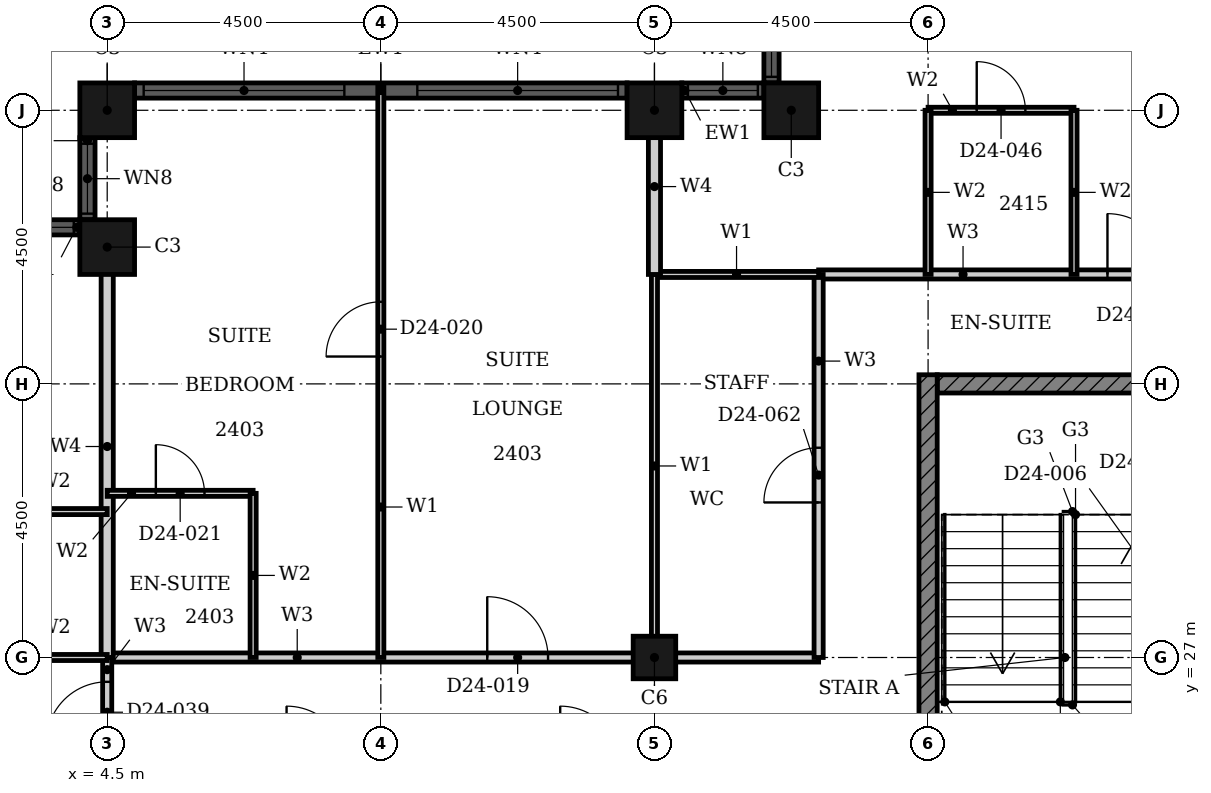
"""IFC4 building model, lengths in metres.
Left out: names, types, materials, properties, quantities, classifications, styles, units other than length and angle.
Written with IfcOpenShell. Run it as: python <this file> out.ifc"""

import sys

from ifc_helpers import new_model, si_unit, direction, frame, frame_2d, origin, origin_2d, place, context, subcontext, project, spatial, rectangle, hollow_rectangle, extrude, element, fill, save


model = new_model("IFC4")
c1 = context("Model", 3, precision=1e-05, world=origin(), true_north=direction((0.0, 1.0)))
c2 = subcontext(c1, "Body", "Model", "MODEL_VIEW")
j1 = project(units=[si_unit("LENGTHUNIT", "METRE"), si_unit("PLANEANGLEUNIT", "RADIAN")], contexts=[c1])
p1 = place(None, origin())
s1 = spatial("IfcSite", under=j1, at=p1, CompositionType="ELEMENT")
p2 = place(p1, origin())
s2 = spatial("IfcBuilding", under=s1, at=p2, CompositionType="ELEMENT")
p3 = place(p2, frame((0.0, 0.0, 100.8)))
s3 = spatial("IfcBuildingStorey", under=s2, at=p3, CompositionType="ELEMENT", Elevation=100.8)
for number, where, z_axis, x_axis in (
    (1, (15.75, 36.0, 0.0), (0.0, 0.0, 1.0), (1.0, 0.0, 0.0)),
    (2, (13.5, 36.0, 0.0), (0.0, 0.0, 1.0), (1.0, 0.0, 0.0)),
    (3, (4.5, 36.0, 0.0), (0.0, 0.0, 1.0), (1.0, 0.0, 0.0)),
    (4, (4.5, 33.75, 0.0), (0.0, 0.0, 1.0), (1.0, 0.0, 0.0)),
):
    element("IfcColumn", number, at=place(p3, frame(where, z_axis=z_axis, x_axis=x_axis)), inside=s3, PredefinedType="COLUMN", context=c2, shape_type="SweptSolid", body=[
        extrude(hollow_rectangle(XDim=0.9, YDim=0.9, WallThickness=0.028, at=origin_2d()), origin(), (0.0, 0.0, 1.0), 3.6),
    ])
p4 = place(p3, frame((13.5, 27.0, 0.0), z_axis=(0.0, 0.0, 1.0), x_axis=(1.0, 0.0, 0.0)))
e5 = element("IfcColumn", 5, at=p4, inside=s3, PredefinedType="COLUMN", context=c2, shape_type="SweptSolid", body=[
    extrude(hollow_rectangle(XDim=0.7, YDim=0.7, WallThickness=0.022, at=origin_2d()), origin(), (0.0, 0.0, 1.0), 3.6),
])
p5 = place(p3, frame((15.425, 37.8, 0.0), z_axis=(0.0, 0.0, 1.0), x_axis=(0.0, -1.0, 0.0)))
e6 = element("IfcWall", 6, at=p5, inside=s3, PredefinedType="SOLIDWALL", context=c2, shape_type="SweptSolid", body=[
    extrude(rectangle(XDim=1.35, YDim=0.25, at=frame_2d((0.675, 0.0))), origin(), (0.0, 0.0, 1.0), 3.6),
])
p6 = place(p5, frame((0.1, 0.0, 0.9)))
e7 = element("IfcOpeningElement", 7, at=p6, cuts=e6, PredefinedType="OPENING", context=c2, shape_type="SweptSolid", body=[
    extrude(rectangle(XDim=1.15, YDim=2.08, at=frame_2d((0.575, 1.04))), frame((0.0, 0.135, 0.0), z_axis=(0.0, -1.0, 0.0), x_axis=(1.0, 0.0, 0.0)), (0.0, 0.0, 1.0), 0.27),
])
p7 = place(p3, frame((15.3, 36.325, 0.0), z_axis=(0.0, 0.0, 1.0), x_axis=(-1.0, 0.0, 0.0)))
e8 = element("IfcWall", 8, at=p7, inside=s3, PredefinedType="SOLIDWALL", context=c2, shape_type="SweptSolid", body=[
    extrude(rectangle(XDim=1.35, YDim=0.25, at=frame_2d((0.675, 0.0))), origin(), (0.0, 0.0, 1.0), 3.6),
])
p8 = place(p7, frame((0.1, 0.0, 0.9)))
e9 = element("IfcOpeningElement", 9, at=p8, cuts=e8, PredefinedType="OPENING", context=c2, shape_type="SweptSolid", body=[
    extrude(rectangle(XDim=1.15, YDim=2.08, at=frame_2d((0.575, 1.04))), frame((0.0, 0.135, 0.0), z_axis=(0.0, -1.0, 0.0), x_axis=(1.0, 0.0, 0.0)), (0.0, 0.0, 1.0), 0.27),
])
p9 = place(p3, frame((13.05, 36.325, 0.0), z_axis=(0.0, 0.0, 1.0), x_axis=(-1.0, 0.0, 0.0)))
e10 = element("IfcWall", 10, at=p9, inside=s3, PredefinedType="SOLIDWALL", context=c2, shape_type="SweptSolid", body=[
    extrude(rectangle(XDim=8.1, YDim=0.25, at=frame_2d((4.05, 0.0))), origin(), (0.0, 0.0, 1.0), 3.6),
])
p10 = place(p9, frame((0.15, 0.0, 0.9)))
e11 = element("IfcOpeningElement", 11, at=p10, cuts=e10, PredefinedType="OPENING", context=c2, shape_type="SweptSolid", body=[
    extrude(rectangle(XDim=3.3, YDim=2.08, at=frame_2d((1.65, 1.04))), frame((0.0, 0.135, 0.0), z_axis=(0.0, -1.0, 0.0), x_axis=(1.0, 0.0, 0.0)), (0.0, 0.0, 1.0), 0.27),
])
p11 = place(p9, frame((4.65, 0.0, 0.9)))
e12 = element("IfcOpeningElement", 12, at=p11, cuts=e10, PredefinedType="OPENING", context=c2, shape_type="SweptSolid", body=[
    extrude(rectangle(XDim=3.3, YDim=2.08, at=frame_2d((1.65, 1.04))), frame((0.0, 0.135, 0.0), z_axis=(0.0, -1.0, 0.0), x_axis=(1.0, 0.0, 0.0)), (0.0, 0.0, 1.0), 0.27),
])
p12 = place(p3, frame((4.175, 35.55, 0.0), z_axis=(0.0, 0.0, 1.0), x_axis=(0.0, -1.0, 0.0)))
e13 = element("IfcWall", 13, at=p12, inside=s3, PredefinedType="SOLIDWALL", context=c2, shape_type="SweptSolid", body=[
    extrude(rectangle(XDim=1.35, YDim=0.25, at=frame_2d((0.675, 0.0))), origin(), (0.0, 0.0, 1.0), 3.6),
])
p13 = place(p12, frame((0.1, 0.0, 0.9)))
e14 = element("IfcOpeningElement", 14, at=p13, cuts=e13, PredefinedType="OPENING", context=c2, shape_type="SweptSolid", body=[
    extrude(rectangle(XDim=1.15, YDim=2.08, at=frame_2d((0.575, 1.04))), frame((0.0, 0.135, 0.0), z_axis=(0.0, -1.0, 0.0), x_axis=(1.0, 0.0, 0.0)), (0.0, 0.0, 1.0), 0.27),
])
p14 = place(p3, frame((4.05, 34.075, 0.0), z_axis=(0.0, 0.0, 1.0), x_axis=(-1.0, 0.0, 0.0)))
e15 = element("IfcWall", 15, at=p14, inside=s3, PredefinedType="SOLIDWALL", context=c2, shape_type="SweptSolid", body=[
    extrude(rectangle(XDim=1.35, YDim=0.25, at=frame_2d((0.675, 0.0))), origin(), (0.0, 0.0, 1.0), 3.6),
])
p15 = place(p14, frame((0.1, 0.0, 0.9)))
e16 = element("IfcOpeningElement", 16, at=p15, cuts=e15, PredefinedType="OPENING", context=c2, shape_type="SweptSolid", body=[
    extrude(rectangle(XDim=1.15, YDim=2.08, at=frame_2d((0.575, 1.04))), frame((0.0, 0.135, 0.0), z_axis=(0.0, -1.0, 0.0), x_axis=(1.0, 0.0, 0.0)), (0.0, 0.0, 1.0), 0.27),
])
p16 = place(p3, frame((18.15, 31.5, 0.0), z_axis=(0.0, 0.0, 1.0), x_axis=(1.0, 0.0, 0.0)))
e17 = element("IfcWall", 17, at=p16, inside=s3, PredefinedType="SHEAR", context=c2, shape_type="SweptSolid", body=[
    extrude(rectangle(XDim=6.797, YDim=0.3, at=frame_2d((3.398, 0.0))), origin(), (0.0, 0.0, 1.0), 3.3),
])
p17 = place(p16, frame((4.736, 0.0, 0.0)))
e18 = element("IfcOpeningElement", 18, at=p17, cuts=e17, PredefinedType="OPENING", context=c2, shape_type="SweptSolid", body=[
    extrude(rectangle(XDim=1.8, YDim=2.1, at=frame_2d((0.9, 1.05))), frame((0.0, 0.16, 0.0), z_axis=(0.0, -1.0, 0.0), x_axis=(1.0, 0.0, 0.0)), (0.0, 0.0, 1.0), 0.32),
])
p18 = place(p3, frame((18.0, 22.35, 0.0), z_axis=(0.0, 0.0, 1.0), x_axis=(0.0, 1.0, 0.0)))
e19 = element("IfcWall", 19, at=p18, inside=s3, PredefinedType="SHEAR", context=c2, shape_type="SweptSolid", body=[
    extrude(rectangle(XDim=9.3, YDim=0.3, at=frame_2d((4.65, 0.0))), origin(), (0.0, 0.0, 1.0), 3.3),
])
p19 = place(p3, frame((4.5, 27.0, 0.0), z_axis=(0.0, 0.0, 1.0), x_axis=(1.0, 0.0, 0.0)))
e20 = element("IfcWall", 20, at=p19, inside=s3, PredefinedType="PARTITIONING", context=c2, shape_type="SweptSolid", body=[
    extrude(rectangle(XDim=11.7, YDim=0.15, at=frame_2d((5.85, 0.0))), origin(), (0.0, 0.0, 1.0), 2.58),
])
p20 = place(p19, frame((6.25, 0.0, 0.0)))
e21 = element("IfcOpeningElement", 21, at=p20, cuts=e20, PredefinedType="OPENING", context=c2, shape_type="SweptSolid", body=[
    extrude(rectangle(XDim=1.0, YDim=2.1, at=frame_2d((0.5, 1.05))), frame((0.0, 0.085, 0.0), z_axis=(0.0, -1.0, 0.0), x_axis=(1.0, 0.0, 0.0)), (0.0, 0.0, 1.0), 0.17),
])
p21 = place(p3, frame((16.2, 33.3, 0.0), z_axis=(0.0, 0.0, 1.0), x_axis=(1.0, 0.0, 0.0)))
e22 = element("IfcWall", 22, at=p21, inside=s3, PredefinedType="PARTITIONING", context=c2, shape_type="SweptSolid", body=[
    extrude(rectangle(XDim=15.3, YDim=0.15, at=frame_2d((7.65, 0.0))), origin(), (0.0, 0.0, 1.0), 3.3),
])
p22 = place(p21, frame((4.75, 0.0, 0.0)))
e23 = element("IfcOpeningElement", 23, at=p22, cuts=e22, PredefinedType="OPENING", context=c2, shape_type="SweptSolid", body=[
    extrude(rectangle(XDim=1.0, YDim=2.1, at=frame_2d((0.5, 1.05))), frame((0.0, 0.085, 0.0), z_axis=(0.0, -1.0, 0.0), x_axis=(1.0, 0.0, 0.0)), (0.0, 0.0, 1.0), 0.17),
])
p23 = place(p21, frame((7.65, 0.0, 0.0)))
e24 = element("IfcOpeningElement", 24, at=p23, cuts=e22, PredefinedType="OPENING", context=c2, shape_type="SweptSolid", body=[
    extrude(rectangle(XDim=0.9, YDim=2.1, at=frame_2d((0.45, 1.05))), frame((0.0, 0.085, 0.0), z_axis=(0.0, -1.0, 0.0), x_axis=(1.0, 0.0, 0.0)), (0.0, 0.0, 1.0), 0.17),
])
p24 = place(p21, frame((12.15, 0.0, 0.0)))
e25 = element("IfcOpeningElement", 25, at=p24, cuts=e22, PredefinedType="OPENING", context=c2, shape_type="SweptSolid", body=[
    extrude(rectangle(XDim=0.9, YDim=2.1, at=frame_2d((0.45, 1.05))), frame((0.0, 0.085, 0.0), z_axis=(0.0, -1.0, 0.0), x_axis=(1.0, 0.0, 0.0)), (0.0, 0.0, 1.0), 0.17),
])
p25 = place(p3, frame((16.2, 27.0, 0.0), z_axis=(0.0, 0.0, 1.0), x_axis=(0.0, 1.0, 0.0)))
e26 = element("IfcWall", 26, at=p25, inside=s3, PredefinedType="PARTITIONING", context=c2, shape_type="SweptSolid", body=[
    extrude(rectangle(XDim=6.3, YDim=0.15, at=frame_2d((3.15, 0.0))), origin(), (0.0, 0.0, 1.0), 3.3),
])
p26 = place(p25, frame((2.55, 0.0, 0.0)))
e27 = element("IfcOpeningElement", 27, at=p26, cuts=e26, PredefinedType="OPENING", context=c2, shape_type="SweptSolid", body=[
    extrude(rectangle(XDim=0.9, YDim=2.1, at=frame_2d((0.45, 1.05))), frame((0.0, 0.085, 0.0), z_axis=(0.0, -1.0, 0.0), x_axis=(1.0, 0.0, 0.0)), (0.0, 0.0, 1.0), 0.17),
])
p27 = place(p3, frame((4.5, 25.2, 0.0), z_axis=(0.0, 0.0, 1.0), x_axis=(0.0, 1.0, 0.0)))
e28 = element("IfcWall", 28, at=p27, inside=s3, PredefinedType="PARTITIONING", context=c2, shape_type="SweptSolid", body=[
    extrude(rectangle(XDim=1.8, YDim=0.15, at=frame_2d((0.9, 0.0))), origin(), (0.0, 0.0, 1.0), 3.3),
])
p28 = place(p27, frame((0.4, 0.0, 0.0)))
e29 = element("IfcOpeningElement", 29, at=p28, cuts=e28, PredefinedType="OPENING", context=c2, shape_type="SweptSolid", body=[
    extrude(rectangle(XDim=1.0, YDim=2.1, at=frame_2d((0.5, 1.05))), frame((0.0, 0.085, 0.0), z_axis=(0.0, -1.0, 0.0), x_axis=(1.0, 0.0, 0.0)), (0.0, 0.0, 1.0), 0.17),
])
p29 = place(p3, frame((13.5, 33.3, 0.0), z_axis=(0.0, 0.0, 1.0), x_axis=(1.0, 0.0, 0.0)))
e30 = element("IfcWall", 30, at=p29, inside=s3, PredefinedType="PARTITIONING", context=c2, shape_type="SweptSolid", body=[
    extrude(rectangle(XDim=2.7, YDim=0.1, at=frame_2d((1.35, 0.0))), origin(), (0.0, 0.0, 1.0), 3.3),
])
p30 = place(p3, frame((13.5, 27.0, 0.0), z_axis=(0.0, 0.0, 1.0), x_axis=(0.0, 1.0, 0.0)))
e31 = element("IfcWall", 31, at=p30, inside=s3, PredefinedType="PARTITIONING", context=c2, shape_type="SweptSolid", body=[
    extrude(rectangle(XDim=6.3, YDim=0.1, at=frame_2d((3.15, 0.0))), origin(), (0.0, 0.0, 1.0), 2.38),
])
p31 = place(p3, frame((9.0, 27.0, 0.0), z_axis=(0.0, 0.0, 1.0), x_axis=(0.0, 1.0, 0.0)))
e32 = element("IfcWall", 32, at=p31, inside=s3, PredefinedType="PARTITIONING", context=c2, shape_type="SweptSolid", body=[
    extrude(rectangle(XDim=9.39, YDim=0.1, at=frame_2d((4.695, 0.0))), origin(), (0.0, 0.0, 1.0), 3.3),
])
p32 = place(p31, frame((4.95, 0.0, 0.0)))
e33 = element("IfcOpeningElement", 33, at=p32, cuts=e32, PredefinedType="OPENING", context=c2, shape_type="SweptSolid", body=[
    extrude(rectangle(XDim=0.9, YDim=2.1, at=frame_2d((0.45, 1.05))), frame((0.0, 0.06, 0.0), z_axis=(0.0, -1.0, 0.0), x_axis=(1.0, 0.0, 0.0)), (0.0, 0.0, 1.0), 0.12),
])
p33 = place(p3, frame((13.5, 33.3, 0.0), z_axis=(0.0, 0.0, 1.0), x_axis=(0.0, 1.0, 0.0)))
e34 = element("IfcWall", 34, at=p33, inside=s3, PredefinedType="PARTITIONING", context=c2, shape_type="SweptSolid", body=[
    extrude(rectangle(XDim=2.89, YDim=0.2, at=frame_2d((1.445, 0.0))), origin(), (0.0, 0.0, 1.0), 2.38),
])
p34 = place(p3, frame((4.5, 27.0, 0.0), z_axis=(0.0, 0.0, 1.0), x_axis=(0.0, 1.0, 0.0)))
e35 = element("IfcWall", 35, at=p34, inside=s3, PredefinedType="PARTITIONING", context=c2, shape_type="SweptSolid", body=[
    extrude(rectangle(XDim=6.94, YDim=0.2, at=frame_2d((3.47, 0.0))), origin(), (0.0, 0.0, 1.0), 3.3),
])
p35 = place(p3, frame((1.8, 27.0, 0.0), z_axis=(0.0, 0.0, 1.0), x_axis=(1.0, 0.0, 0.0)))
e36 = element("IfcWall", 36, at=p35, inside=s3, PredefinedType="PARTITIONING", context=c2, shape_type="SweptSolid", body=[
    extrude(rectangle(XDim=2.7, YDim=0.1, at=frame_2d((1.35, 0.0))), origin(), (0.0, 0.0, 1.0), 2.58),
])
p36 = place(p3, frame((1.8, 29.4, 0.0), z_axis=(0.0, 0.0, 1.0), x_axis=(1.0, 0.0, 0.0)))
e37 = element("IfcWall", 37, at=p36, inside=s3, PredefinedType="PARTITIONING", context=c2, shape_type="SweptSolid", body=[
    extrude(rectangle(XDim=2.7, YDim=0.1, at=frame_2d((1.35, 0.0))), origin(), (0.0, 0.0, 1.0), 3.3),
])
p37 = place(p3, frame((4.5, 29.7, 0.0), z_axis=(0.0, 0.0, 1.0), x_axis=(1.0, 0.0, 0.0)))
e38 = element("IfcWall", 38, at=p37, inside=s3, PredefinedType="PARTITIONING", context=c2, shape_type="SweptSolid", body=[
    extrude(rectangle(XDim=2.4, YDim=0.1, at=frame_2d((1.2, 0.0))), origin(), (0.0, 0.0, 1.0), 3.3),
])
p38 = place(p37, frame((0.8, 0.0, 0.0)))
e39 = element("IfcOpeningElement", 39, at=p38, cuts=e38, PredefinedType="OPENING", context=c2, shape_type="SweptSolid", body=[
    extrude(rectangle(XDim=0.8, YDim=2.1, at=frame_2d((0.4, 1.05))), frame((0.0, 0.06, 0.0), z_axis=(0.0, -1.0, 0.0), x_axis=(1.0, 0.0, 0.0)), (0.0, 0.0, 1.0), 0.12),
])
p39 = place(p3, frame((18.0, 36.0, 0.0), z_axis=(0.0, 0.0, 1.0), x_axis=(1.0, 0.0, 0.0)))
e40 = element("IfcWall", 40, at=p39, inside=s3, PredefinedType="PARTITIONING", context=c2, shape_type="SweptSolid", body=[
    extrude(rectangle(XDim=2.4, YDim=0.1, at=frame_2d((1.2, 0.0))), origin(), (0.0, 0.0, 1.0), 3.3),
])
p40 = place(p39, frame((0.8, 0.0, 0.0)))
e41 = element("IfcOpeningElement", 41, at=p40, cuts=e40, PredefinedType="OPENING", context=c2, shape_type="SweptSolid", body=[
    extrude(rectangle(XDim=0.8, YDim=2.1, at=frame_2d((0.4, 1.05))), frame((0.0, 0.06, 0.0), z_axis=(0.0, -1.0, 0.0), x_axis=(1.0, 0.0, 0.0)), (0.0, 0.0, 1.0), 0.12),
])
for number, where, z_axis, x_axis in (
    (42, (18.0, 33.3, 0.0), (0.0, 0.0, 1.0), (0.0, 1.0, 0.0)),
    (43, (20.4, 33.3, 0.0), (0.0, 0.0, 1.0), (0.0, 1.0, 0.0)),
    (44, (6.9, 27.0, 0.0), (0.0, 0.0, 1.0), (0.0, 1.0, 0.0)),
):
    element("IfcWall", number, at=place(p3, frame(where, z_axis=z_axis, x_axis=x_axis)), inside=s3, PredefinedType="PARTITIONING", context=c2, shape_type="SweptSolid", body=[
        extrude(rectangle(XDim=2.7, YDim=0.1, at=frame_2d((1.35, 0.0))), origin(), (0.0, 0.0, 1.0), 3.3),
    ])
p41 = place(p6, origin())
e45 = element("IfcWindow", 45, at=p41, inside=s3, PartitioningType="SINGLE_PANEL", PredefinedType="WINDOW", context=c2, shape_type="SweptSolid", body=[
    extrude(rectangle(XDim=1.15, YDim=2.08, at=frame_2d((0.575, 1.04))), frame((0.0, 0.03, 0.0), z_axis=(0.0, -1.0, 0.0), x_axis=(1.0, 0.0, 0.0)), (0.0, 0.0, 1.0), 0.06),
])
fill(e7, e45)
p42 = place(p8, origin())
e46 = element("IfcWindow", 46, at=p42, inside=s3, PartitioningType="SINGLE_PANEL", PredefinedType="WINDOW", context=c2, shape_type="SweptSolid", body=[
    extrude(rectangle(XDim=1.15, YDim=2.08, at=frame_2d((0.575, 1.04))), frame((0.0, 0.03, 0.0), z_axis=(0.0, -1.0, 0.0), x_axis=(1.0, 0.0, 0.0)), (0.0, 0.0, 1.0), 0.06),
])
fill(e9, e46)
p43 = place(p10, origin())
e47 = element("IfcWindow", 47, at=p43, inside=s3, PartitioningType="SINGLE_PANEL", PredefinedType="WINDOW", context=c2, shape_type="SweptSolid", body=[
    extrude(rectangle(XDim=3.3, YDim=2.08, at=frame_2d((1.65, 1.04))), frame((0.0, 0.03, 0.0), z_axis=(0.0, -1.0, 0.0), x_axis=(1.0, 0.0, 0.0)), (0.0, 0.0, 1.0), 0.06),
])
fill(e11, e47)
p44 = place(p11, origin())
e48 = element("IfcWindow", 48, at=p44, inside=s3, PartitioningType="SINGLE_PANEL", PredefinedType="WINDOW", context=c2, shape_type="SweptSolid", body=[
    extrude(rectangle(XDim=3.3, YDim=2.08, at=frame_2d((1.65, 1.04))), frame((0.0, 0.03, 0.0), z_axis=(0.0, -1.0, 0.0), x_axis=(1.0, 0.0, 0.0)), (0.0, 0.0, 1.0), 0.06),
])
fill(e12, e48)
p45 = place(p13, origin())
e49 = element("IfcWindow", 49, at=p45, inside=s3, PartitioningType="SINGLE_PANEL", PredefinedType="WINDOW", context=c2, shape_type="SweptSolid", body=[
    extrude(rectangle(XDim=1.15, YDim=2.08, at=frame_2d((0.575, 1.04))), frame((0.0, 0.03, 0.0), z_axis=(0.0, -1.0, 0.0), x_axis=(1.0, 0.0, 0.0)), (0.0, 0.0, 1.0), 0.06),
])
fill(e14, e49)
p46 = place(p15, origin())
e50 = element("IfcWindow", 50, at=p46, inside=s3, PartitioningType="SINGLE_PANEL", PredefinedType="WINDOW", context=c2, shape_type="SweptSolid", body=[
    extrude(rectangle(XDim=1.15, YDim=2.08, at=frame_2d((0.575, 1.04))), frame((0.0, 0.03, 0.0), z_axis=(0.0, -1.0, 0.0), x_axis=(1.0, 0.0, 0.0)), (0.0, 0.0, 1.0), 0.06),
])
fill(e16, e50)
p47 = place(p20, origin())
e51 = element("IfcDoor", 51, at=p47, inside=s3, OperationType="SINGLE_SWING_LEFT", PredefinedType="DOOR", context=c2, shape_type="SweptSolid", body=[
    extrude(rectangle(XDim=1.0, YDim=2.1, at=frame_2d((0.5, 1.05))), frame((0.0, 0.025, 0.0), z_axis=(0.0, -1.0, 0.0), x_axis=(1.0, 0.0, 0.0)), (0.0, 0.0, 1.0), 0.05),
])
fill(e21, e51)
p48 = place(p32, origin())
e52 = element("IfcDoor", 52, at=p48, inside=s3, OperationType="SINGLE_SWING_RIGHT", PredefinedType="DOOR", context=c2, shape_type="SweptSolid", body=[
    extrude(rectangle(XDim=0.9, YDim=2.1, at=frame_2d((0.45, 1.05))), frame((0.0, 0.025, 0.0), z_axis=(0.0, -1.0, 0.0), x_axis=(1.0, 0.0, 0.0)), (0.0, 0.0, 1.0), 0.05),
])
fill(e33, e52)
p49 = place(p38, origin())
e53 = element("IfcDoor", 53, at=p49, inside=s3, OperationType="SINGLE_SWING_LEFT", PredefinedType="DOOR", context=c2, shape_type="SweptSolid", body=[
    extrude(rectangle(XDim=0.8, YDim=2.1, at=frame_2d((0.4, 1.05))), frame((0.0, 0.025, 0.0), z_axis=(0.0, -1.0, 0.0), x_axis=(1.0, 0.0, 0.0)), (0.0, 0.0, 1.0), 0.05),
])
fill(e39, e53)
p50 = place(p28, origin())
e54 = element("IfcDoor", 54, at=p50, inside=s3, OperationType="SINGLE_SWING_LEFT", PredefinedType="DOOR", context=c2, shape_type="SweptSolid", body=[
    extrude(rectangle(XDim=1.0, YDim=2.1, at=frame_2d((0.5, 1.05))), frame((0.0, 0.025, 0.0), z_axis=(0.0, -1.0, 0.0), x_axis=(1.0, 0.0, 0.0)), (0.0, 0.0, 1.0), 0.05),
])
fill(e29, e54)
p51 = place(p22, origin())
e55 = element("IfcDoor", 55, at=p51, inside=s3, OperationType="SINGLE_SWING_RIGHT", PredefinedType="DOOR", context=c2, shape_type="SweptSolid", body=[
    extrude(rectangle(XDim=1.0, YDim=2.1, at=frame_2d((0.5, 1.05))), frame((0.0, 0.025, 0.0), z_axis=(0.0, -1.0, 0.0), x_axis=(1.0, 0.0, 0.0)), (0.0, 0.0, 1.0), 0.05),
])
fill(e23, e55)
p52 = place(p40, origin())
e56 = element("IfcDoor", 56, at=p52, inside=s3, OperationType="SINGLE_SWING_RIGHT", PredefinedType="DOOR", context=c2, shape_type="SweptSolid", body=[
    extrude(rectangle(XDim=0.8, YDim=2.1, at=frame_2d((0.4, 1.05))), frame((0.0, 0.025, 0.0), z_axis=(0.0, -1.0, 0.0), x_axis=(1.0, 0.0, 0.0)), (0.0, 0.0, 1.0), 0.05),
])
fill(e41, e56)
p53 = place(p26, origin())
e57 = element("IfcDoor", 57, at=p53, inside=s3, OperationType="SINGLE_SWING_LEFT", PredefinedType="DOOR", context=c2, shape_type="SweptSolid", body=[
    extrude(rectangle(XDim=0.9, YDim=2.1, at=frame_2d((0.45, 1.05))), frame((0.0, 0.025, 0.0), z_axis=(0.0, -1.0, 0.0), x_axis=(1.0, 0.0, 0.0)), (0.0, 0.0, 1.0), 0.05),
])
fill(e27, e57)
save(model, sys.argv[1])
